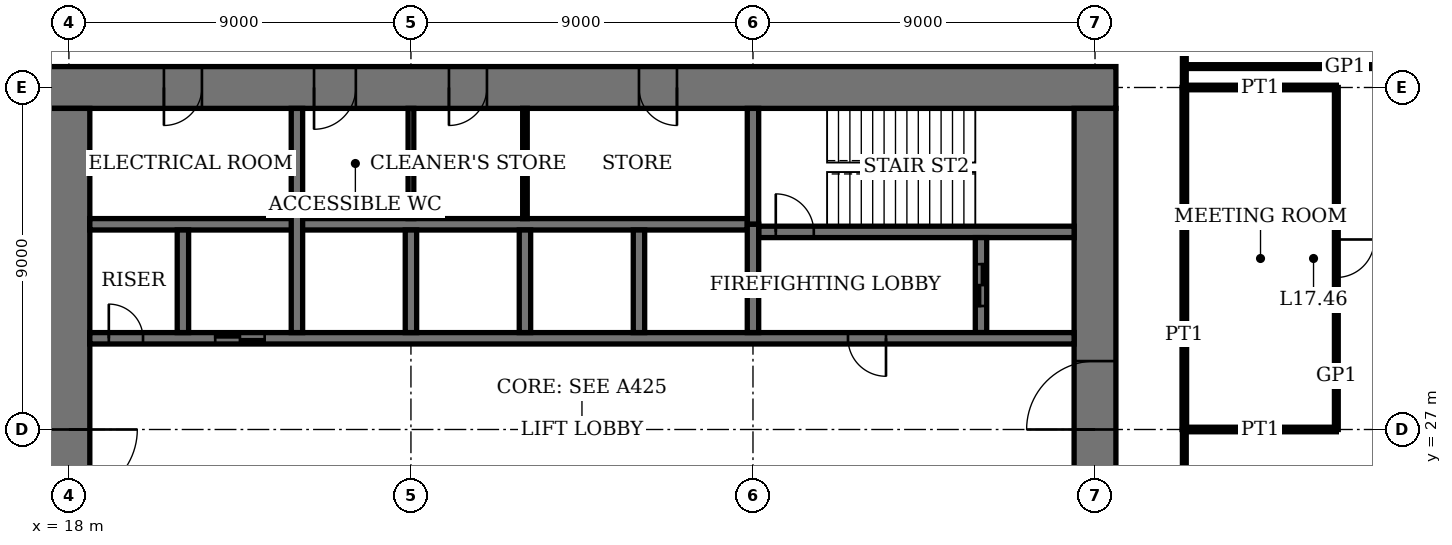
"""IFC4 building model, lengths in metres.
Left out: names, types, materials, properties, quantities, classifications, styles, units other than length and angle.
Written with IfcOpenShell. Run it as: python <this file> out.ifc"""

import sys

from ifc_helpers import new_model, si_unit, direction, frame, frame_2d, origin, place, context, subcontext, project, spatial, rectangle, extrude, element, fill, save


model = new_model("IFC4")
c1 = context("Model", 3, precision=1e-05, world=origin(), true_north=direction((0.0, 1.0)))
c2 = subcontext(c1, "Body", "Model", "MODEL_VIEW")
j1 = project(units=[si_unit("LENGTHUNIT", "METRE"), si_unit("PLANEANGLEUNIT", "RADIAN")], contexts=[c1])
p1 = place(None, origin())
s1 = spatial("IfcSite", under=j1, at=p1, CompositionType="ELEMENT")
p2 = place(p1, origin())
s2 = spatial("IfcBuilding", under=s1, at=p2, CompositionType="ELEMENT")
p3 = place(p2, frame((0.0, 0.0, 71.8)))
s3 = spatial("IfcBuildingStorey", under=s2, at=p3, CompositionType="ELEMENT", Elevation=71.8)
p4 = place(p3, frame((45.55, 36.0, 0.0), z_axis=(0.0, 0.0, 1.0), x_axis=(-1.0, 0.0, 0.0)))
e1 = element("IfcWall", 1, at=p4, inside=s3, PredefinedType="SHEAR", context=c2, shape_type="SweptSolid", body=[
    extrude(rectangle(XDim=28.1, YDim=1.1, at=frame_2d((14.05, 0.0))), origin(), (0.0, 0.0, 1.0), 4.0),
])
p5 = place(p4, frame((11.55, 0.0, 0.0)))
e2 = element("IfcOpeningElement", 2, at=p5, cuts=e1, PredefinedType="OPENING", context=c2, shape_type="SweptSolid", body=[
    extrude(rectangle(XDim=1.0, YDim=2.4, at=frame_2d((0.5, 1.2))), frame((0.0, 0.56, 0.0), z_axis=(0.0, -1.0, 0.0), x_axis=(1.0, 0.0, 0.0)), (0.0, 0.0, 1.0), 1.12),
])
p6 = place(p4, frame((16.55, 0.0, 0.0)))
e3 = element("IfcOpeningElement", 3, at=p6, cuts=e1, PredefinedType="OPENING", context=c2, shape_type="SweptSolid", body=[
    extrude(rectangle(XDim=1.0, YDim=2.4, at=frame_2d((0.5, 1.2))), frame((0.0, 0.56, 0.0), z_axis=(0.0, -1.0, 0.0), x_axis=(1.0, 0.0, 0.0)), (0.0, 0.0, 1.0), 1.12),
])
p7 = place(p4, frame((20.0, 0.0, 0.0)))
e4 = element("IfcOpeningElement", 4, at=p7, cuts=e1, PredefinedType="OPENING", context=c2, shape_type="SweptSolid", body=[
    extrude(rectangle(XDim=1.1, YDim=2.4, at=frame_2d((0.55, 1.2))), frame((0.0, 0.56, 0.0), z_axis=(0.0, -1.0, 0.0), x_axis=(1.0, 0.0, 0.0)), (0.0, 0.0, 1.0), 1.12),
])
p8 = place(p4, frame((24.05, 0.0, 0.0)))
e5 = element("IfcOpeningElement", 5, at=p8, cuts=e1, PredefinedType="OPENING", context=c2, shape_type="SweptSolid", body=[
    extrude(rectangle(XDim=1.0, YDim=2.4, at=frame_2d((0.5, 1.2))), frame((0.0, 0.56, 0.0), z_axis=(0.0, -1.0, 0.0), x_axis=(1.0, 0.0, 0.0)), (0.0, 0.0, 1.0), 1.12),
])
p9 = place(p3, frame((18.0, 35.45, 0.0), z_axis=(0.0, 0.0, 1.0), x_axis=(0.0, -1.0, 0.0)))
e6 = element("IfcWall", 6, at=p9, inside=s3, PredefinedType="SHEAR", context=c2, shape_type="SweptSolid", body=[
    extrude(rectangle(XDim=16.9, YDim=1.1, at=frame_2d((8.45, 0.0))), origin(), (0.0, 0.0, 1.0), 4.0),
])
p10 = place(p9, frame((8.45, 0.0, 0.0)))
e7 = element("IfcOpeningElement", 7, at=p10, cuts=e6, PredefinedType="OPENING", context=c2, shape_type="SweptSolid", body=[
    extrude(rectangle(XDim=1.8, YDim=2.4, at=frame_2d((0.9, 1.2))), frame((0.0, 0.56, 0.0), z_axis=(0.0, -1.0, 0.0), x_axis=(1.0, 0.0, 0.0)), (0.0, 0.0, 1.0), 1.12),
])
p11 = place(p3, frame((45.0, 18.55, 0.0), z_axis=(0.0, 0.0, 1.0), x_axis=(0.0, 1.0, 0.0)))
e8 = element("IfcWall", 8, at=p11, inside=s3, PredefinedType="SHEAR", context=c2, shape_type="SweptSolid", body=[
    extrude(rectangle(XDim=16.9, YDim=1.1, at=frame_2d((8.45, 0.0))), origin(), (0.0, 0.0, 1.0), 4.0),
])
p12 = place(p11, frame((8.45, 0.0, 0.0)))
e9 = element("IfcOpeningElement", 9, at=p12, cuts=e8, PredefinedType="OPENING", context=c2, shape_type="SweptSolid", body=[
    extrude(rectangle(XDim=1.8, YDim=2.4, at=frame_2d((0.9, 1.2))), frame((0.0, 0.56, 0.0), z_axis=(0.0, -1.0, 0.0), x_axis=(1.0, 0.0, 0.0)), (0.0, 0.0, 1.0), 1.12),
])
p13 = place(p3, frame((36.15, 32.2, 0.0), z_axis=(0.0, 0.0, 1.0), x_axis=(1.0, 0.0, 0.0)))
e10 = element("IfcWall", 10, at=p13, inside=s3, PredefinedType="SHEAR", context=c2, shape_type="SweptSolid", body=[
    extrude(rectangle(XDim=8.3, YDim=0.3, at=frame_2d((4.15, 0.0))), origin(), (0.0, 0.0, 1.0), 4.0),
])
p14 = place(p13, frame((0.45, 0.0, 0.0)))
e11 = element("IfcOpeningElement", 11, at=p14, cuts=e10, PredefinedType="OPENING", context=c2, shape_type="SweptSolid", body=[
    extrude(rectangle(XDim=1.0, YDim=2.4, at=frame_2d((0.5, 1.2))), frame((0.0, 0.16, 0.0), z_axis=(0.0, -1.0, 0.0), x_axis=(1.0, 0.0, 0.0)), (0.0, 0.0, 1.0), 0.32),
])
p15 = place(p3, frame((36.0, 32.4, 0.0), z_axis=(0.0, 0.0, 1.0), x_axis=(0.0, 1.0, 0.0)))
e12 = element("IfcWall", 12, at=p15, inside=s3, PredefinedType="SHEAR", context=c2, shape_type="SweptSolid", body=[
    extrude(rectangle(XDim=3.05, YDim=0.3, at=frame_2d((1.525, 0.0))), origin(), (0.0, 0.0, 1.0), 4.0),
])
p16 = place(p3, frame((42.0, 29.55, 0.0), z_axis=(0.0, 0.0, 1.0), x_axis=(0.0, 1.0, 0.0)))
e13 = element("IfcWall", 13, at=p16, inside=s3, PredefinedType="SHEAR", context=c2, shape_type="SweptSolid", body=[
    extrude(rectangle(XDim=2.5, YDim=0.3, at=frame_2d((1.25, 0.0))), origin(), (0.0, 0.0, 1.0), 4.0),
])
p17 = place(p16, frame((0.7, 0.0, 0.0)))
e14 = element("IfcOpeningElement", 14, at=p17, cuts=e13, PredefinedType="OPENING", context=c2, shape_type="SweptSolid", body=[
    extrude(rectangle(XDim=1.1, YDim=2.4, at=frame_2d((0.55, 1.2))), frame((0.0, 0.16, 0.0), z_axis=(0.0, -1.0, 0.0), x_axis=(1.0, 0.0, 0.0)), (0.0, 0.0, 1.0), 0.32),
])
p18 = place(p3, frame((18.55, 29.4, 0.0), z_axis=(0.0, 0.0, 1.0), x_axis=(1.0, 0.0, 0.0)))
e15 = element("IfcWall", 15, at=p18, inside=s3, PredefinedType="SHEAR", context=c2, shape_type="SweptSolid", body=[
    extrude(rectangle(XDim=25.9, YDim=0.3, at=frame_2d((12.95, 0.0))), origin(), (0.0, 0.0, 1.0), 4.0),
])
p19 = place(p18, frame((19.95, 0.0, 0.0)))
e16 = element("IfcOpeningElement", 16, at=p19, cuts=e15, PredefinedType="OPENING", context=c2, shape_type="SweptSolid", body=[
    extrude(rectangle(XDim=1.0, YDim=2.4, at=frame_2d((0.5, 1.2))), frame((0.0, 0.16, 0.0), z_axis=(0.0, -1.0, 0.0), x_axis=(1.0, 0.0, 0.0)), (0.0, 0.0, 1.0), 0.32),
])
p20 = place(p18, frame((0.5, 0.0, 0.0)))
e17 = element("IfcOpeningElement", 17, at=p20, cuts=e15, PredefinedType="OPENING", context=c2, shape_type="SweptSolid", body=[
    extrude(rectangle(XDim=0.9, YDim=2.1, at=frame_2d((0.45, 1.05))), frame((0.0, 0.16, 0.0), z_axis=(0.0, -1.0, 0.0), x_axis=(1.0, 0.0, 0.0)), (0.0, 0.0, 1.0), 0.32),
])
p21 = place(p18, frame((3.3, 0.0, 0.0)))
e18 = element("IfcOpeningElement", 18, at=p21, cuts=e15, PredefinedType="OPENING", context=c2, shape_type="SweptSolid", body=[
    extrude(rectangle(XDim=1.3, YDim=2.4, at=frame_2d((0.65, 1.2))), frame((0.0, 0.16, 0.0), z_axis=(0.0, -1.0, 0.0), x_axis=(1.0, 0.0, 0.0)), (0.0, 0.0, 1.0), 0.32),
])
p22 = place(p3, frame((18.55, 32.4, 0.0), z_axis=(0.0, 0.0, 1.0), x_axis=(1.0, 0.0, 0.0)))
e19 = element("IfcWall", 19, at=p22, inside=s3, PredefinedType="SHEAR", context=c2, shape_type="SweptSolid", body=[
    extrude(rectangle(XDim=17.3, YDim=0.3, at=frame_2d((8.65, 0.0))), origin(), (0.0, 0.0, 1.0), 4.0),
])
for number, where, z_axis, x_axis in (
    (20, (33.0, 29.55, 0.0), (0.0, 0.0, 1.0), (0.0, 1.0, 0.0)),
    (21, (30.0, 29.55, 0.0), (0.0, 0.0, 1.0), (0.0, 1.0, 0.0)),
    (22, (27.0, 29.55, 0.0), (0.0, 0.0, 1.0), (0.0, 1.0, 0.0)),
):
    element("IfcWall", number, at=place(p3, frame(where, z_axis=z_axis, x_axis=x_axis)), inside=s3, PredefinedType="SHEAR", context=c2, shape_type="SweptSolid", body=[
        extrude(rectangle(XDim=2.7, YDim=0.3, at=frame_2d((1.35, 0.0))), origin(), (0.0, 0.0, 1.0), 4.0),
    ])
p23 = place(p3, frame((24.0, 29.55, 0.0), z_axis=(0.0, 0.0, 1.0), x_axis=(0.0, 1.0, 0.0)))
e23 = element("IfcWall", 23, at=p23, inside=s3, PredefinedType="SHEAR", context=c2, shape_type="SweptSolid", body=[
    extrude(rectangle(XDim=5.9, YDim=0.3, at=frame_2d((2.95, 0.0))), origin(), (0.0, 0.0, 1.0), 4.0),
])
p24 = place(p3, frame((21.0, 29.55, 0.0), z_axis=(0.0, 0.0, 1.0), x_axis=(0.0, 1.0, 0.0)))
e24 = element("IfcWall", 24, at=p24, inside=s3, PredefinedType="SHEAR", context=c2, shape_type="SweptSolid", body=[
    extrude(rectangle(XDim=2.7, YDim=0.3, at=frame_2d((1.35, 0.0))), origin(), (0.0, 0.0, 1.0), 4.0),
])
p25 = place(p3, frame((36.0, 29.55, 0.0), z_axis=(0.0, 0.0, 1.0), x_axis=(0.0, 1.0, 0.0)))
e25 = element("IfcWall", 25, at=p25, inside=s3, PredefinedType="SHEAR", context=c2, shape_type="SweptSolid", body=[
    extrude(rectangle(XDim=2.85, YDim=0.3, at=frame_2d((1.425, 0.0))), origin(), (0.0, 0.0, 1.0), 4.0),
])
for number, where, z_axis, x_axis in (
    (26, (47.35, 27.0, 0.0), (0.0, 0.0, 1.0), (1.0, 0.0, 0.0)),
    (27, (47.35, 36.0, 0.0), (0.0, 0.0, 1.0), (1.0, 0.0, 0.0)),
):
    element("IfcWall", number, at=place(p3, frame(where, z_axis=z_axis, x_axis=x_axis)), inside=s3, PredefinedType="PARTITIONING", context=c2, shape_type="SweptSolid", body=[
        extrude(rectangle(XDim=4.0, YDim=0.12, at=frame_2d((2.0, 0.0))), origin(), (0.0, 0.0, 1.0), 3.05),
    ])
p26 = place(p3, frame((47.35, 36.55, 0.0), z_axis=(0.0, 0.0, 1.0), x_axis=(1.0, 0.0, 0.0)))
e28 = element("IfcWall", 28, at=p26, inside=s3, PredefinedType="PARTITIONING", context=c2, shape_type="SweptSolid", body=[
    extrude(rectangle(XDim=5.575, YDim=0.1, at=frame_2d((2.788, 0.0))), origin(), (0.0, 0.0, 1.0), 3.05),
])
p27 = place(p3, frame((47.35, 27.0, 0.0), z_axis=(0.0, 0.0, 1.0), x_axis=(0.0, 1.0, 0.0)))
e29 = element("IfcWall", 29, at=p27, inside=s3, PredefinedType="PARTITIONING", context=c2, shape_type="SweptSolid", body=[
    extrude(rectangle(XDim=9.0, YDim=0.12, at=frame_2d((4.5, 0.0))), origin(), (0.0, 0.0, 1.0), 3.75),
])
p28 = place(p3, frame((47.35, 15.65, 0.0), z_axis=(0.0, 0.0, 1.0), x_axis=(0.0, 1.0, 0.0)))
e30 = element("IfcWall", 30, at=p28, inside=s3, PredefinedType="PARTITIONING", context=c2, shape_type="SweptSolid", body=[
    extrude(rectangle(XDim=11.35, YDim=0.1, at=frame_2d((5.675, 0.0))), origin(), (0.0, 0.0, 1.0), 3.75),
])
p29 = place(p28, frame((5.175, 0.0, 0.0)))
e31 = element("IfcOpeningElement", 31, at=p29, cuts=e30, PredefinedType="OPENING", context=c2, shape_type="SweptSolid", body=[
    extrude(rectangle(XDim=1.0, YDim=2.4, at=frame_2d((0.5, 1.2))), frame((0.0, 0.06, 0.0), z_axis=(0.0, -1.0, 0.0), x_axis=(1.0, 0.0, 0.0)), (0.0, 0.0, 1.0), 0.12),
])
p30 = place(p3, frame((47.35, 36.0, 0.0), z_axis=(0.0, 0.0, 1.0), x_axis=(0.0, 1.0, 0.0)))
e32 = element("IfcWall", 32, at=p30, inside=s3, PredefinedType="PARTITIONING", context=c2, shape_type="SweptSolid", body=[
    extrude(rectangle(XDim=2.35, YDim=0.1, at=frame_2d((1.175, 0.0))), origin(), (0.0, 0.0, 1.0), 3.75),
])
p31 = place(p3, frame((51.35, 27.0, 0.0), z_axis=(0.0, 0.0, 1.0), x_axis=(0.0, 1.0, 0.0)))
e33 = element("IfcWall", 33, at=p31, inside=s3, PredefinedType="PARTITIONING", context=c2, shape_type="SweptSolid", body=[
    extrude(rectangle(XDim=9.0, YDim=0.1, at=frame_2d((4.5, 0.0))), origin(), (0.0, 0.0, 1.0), 3.75),
])
p32 = place(p31, frame((4.0, 0.0, 0.0)))
e34 = element("IfcOpeningElement", 34, at=p32, cuts=e33, PredefinedType="OPENING", context=c2, shape_type="SweptSolid", body=[
    extrude(rectangle(XDim=1.0, YDim=2.4, at=frame_2d((0.5, 1.2))), frame((0.0, 0.06, 0.0), z_axis=(0.0, -1.0, 0.0), x_axis=(1.0, 0.0, 0.0)), (0.0, 0.0, 1.0), 0.12),
])
p33 = place(p3, frame((30.0, 32.55, 0.0), z_axis=(0.0, 0.0, 1.0), x_axis=(0.0, 1.0, 0.0)))
e35 = element("IfcWall", 35, at=p33, inside=s3, PredefinedType="PARTITIONING", context=c2, shape_type="SweptSolid", body=[
    extrude(rectangle(XDim=2.9, YDim=0.12, at=frame_2d((1.45, 0.0))), origin(), (0.0, 0.0, 1.0), 3.75),
])
p34 = place(p3, frame((27.0, 32.55, 0.0), z_axis=(0.0, 0.0, 1.0), x_axis=(0.0, 1.0, 0.0)))
e36 = element("IfcWall", 36, at=p34, inside=s3, PredefinedType="PARTITIONING", context=c2, shape_type="SweptSolid", body=[
    extrude(rectangle(XDim=2.9, YDim=0.15, at=frame_2d((1.45, 0.0))), origin(), (0.0, 0.0, 1.0), 3.75),
])
p35 = place(p10, origin())
e37 = element("IfcDoor", 37, at=p35, inside=s3, OperationType="DOUBLE_DOOR_DOUBLE_SWING", PredefinedType="DOOR", context=c2, shape_type="SweptSolid", body=[
    extrude(rectangle(XDim=1.8, YDim=2.4, at=frame_2d((0.9, 1.2))), frame((0.0, 0.03, 0.0), z_axis=(0.0, -1.0, 0.0), x_axis=(1.0, 0.0, 0.0)), (0.0, 0.0, 1.0), 0.06),
    extrude(rectangle(XDim=0.04, YDim=2.4, at=frame_2d((0.02, 1.2))), frame((0.0, 0.55, 0.0), z_axis=(0.0, -1.0, 0.0), x_axis=(1.0, 0.0, 0.0)), (0.0, 0.0, 1.0), 1.1),
    extrude(rectangle(XDim=0.04, YDim=2.4, at=frame_2d((1.78, 1.2))), frame((0.0, 0.55, 0.0), z_axis=(0.0, -1.0, 0.0), x_axis=(1.0, 0.0, 0.0)), (0.0, 0.0, 1.0), 1.1),
    extrude(rectangle(XDim=1.8, YDim=0.04, at=frame_2d((0.9, 2.38))), frame((0.0, 0.55, 0.0), z_axis=(0.0, -1.0, 0.0), x_axis=(1.0, 0.0, 0.0)), (0.0, 0.0, 1.0), 1.1),
])
fill(e7, e37)
p36 = place(p12, origin())
e38 = element("IfcDoor", 38, at=p36, inside=s3, OperationType="DOUBLE_DOOR_DOUBLE_SWING", PredefinedType="DOOR", context=c2, shape_type="SweptSolid", body=[
    extrude(rectangle(XDim=1.8, YDim=2.4, at=frame_2d((0.9, 1.2))), frame((0.0, 0.03, 0.0), z_axis=(0.0, -1.0, 0.0), x_axis=(1.0, 0.0, 0.0)), (0.0, 0.0, 1.0), 0.06),
    extrude(rectangle(XDim=0.04, YDim=2.4, at=frame_2d((0.02, 1.2))), frame((0.0, 0.55, 0.0), z_axis=(0.0, -1.0, 0.0), x_axis=(1.0, 0.0, 0.0)), (0.0, 0.0, 1.0), 1.1),
    extrude(rectangle(XDim=0.04, YDim=2.4, at=frame_2d((1.78, 1.2))), frame((0.0, 0.55, 0.0), z_axis=(0.0, -1.0, 0.0), x_axis=(1.0, 0.0, 0.0)), (0.0, 0.0, 1.0), 1.1),
    extrude(rectangle(XDim=1.8, YDim=0.04, at=frame_2d((0.9, 2.38))), frame((0.0, 0.55, 0.0), z_axis=(0.0, -1.0, 0.0), x_axis=(1.0, 0.0, 0.0)), (0.0, 0.0, 1.0), 1.1),
])
fill(e9, e38)
p37 = place(p5, origin())
e39 = element("IfcDoor", 39, at=p37, inside=s3, OperationType="SINGLE_SWING_RIGHT", PredefinedType="DOOR", context=c2, shape_type="SweptSolid", body=[
    extrude(rectangle(XDim=1.0, YDim=2.4, at=frame_2d((0.5, 1.2))), frame((0.0, 0.025, 0.0), z_axis=(0.0, -1.0, 0.0), x_axis=(1.0, 0.0, 0.0)), (0.0, 0.0, 1.0), 0.05),
    extrude(rectangle(XDim=0.04, YDim=2.4, at=frame_2d((0.02, 1.2))), frame((0.0, 0.4, 0.0), z_axis=(0.0, -1.0, 0.0), x_axis=(1.0, 0.0, 0.0)), (0.0, 0.0, 1.0), 0.8),
    extrude(rectangle(XDim=0.04, YDim=2.4, at=frame_2d((0.98, 1.2))), frame((0.0, 0.4, 0.0), z_axis=(0.0, -1.0, 0.0), x_axis=(1.0, 0.0, 0.0)), (0.0, 0.0, 1.0), 0.8),
    extrude(rectangle(XDim=1.0, YDim=0.04, at=frame_2d((0.5, 2.38))), frame((0.0, 0.4, 0.0), z_axis=(0.0, -1.0, 0.0), x_axis=(1.0, 0.0, 0.0)), (0.0, 0.0, 1.0), 0.8),
])
fill(e2, e39)
p38 = place(p6, origin())
e40 = element("IfcDoor", 40, at=p38, inside=s3, OperationType="SINGLE_SWING_LEFT", PredefinedType="DOOR", context=c2, shape_type="SweptSolid", body=[
    extrude(rectangle(XDim=1.0, YDim=2.4, at=frame_2d((0.5, 1.2))), frame((0.0, 0.025, 0.0), z_axis=(0.0, -1.0, 0.0), x_axis=(1.0, 0.0, 0.0)), (0.0, 0.0, 1.0), 0.05),
    extrude(rectangle(XDim=0.04, YDim=2.4, at=frame_2d((0.02, 1.2))), frame((0.0, 0.4, 0.0), z_axis=(0.0, -1.0, 0.0), x_axis=(1.0, 0.0, 0.0)), (0.0, 0.0, 1.0), 0.8),
    extrude(rectangle(XDim=0.04, YDim=2.4, at=frame_2d((0.98, 1.2))), frame((0.0, 0.4, 0.0), z_axis=(0.0, -1.0, 0.0), x_axis=(1.0, 0.0, 0.0)), (0.0, 0.0, 1.0), 0.8),
    extrude(rectangle(XDim=1.0, YDim=0.04, at=frame_2d((0.5, 2.38))), frame((0.0, 0.4, 0.0), z_axis=(0.0, -1.0, 0.0), x_axis=(1.0, 0.0, 0.0)), (0.0, 0.0, 1.0), 0.8),
])
fill(e3, e40)
p39 = place(p7, origin())
e41 = element("IfcDoor", 41, at=p39, inside=s3, OperationType="SINGLE_SWING_LEFT", PredefinedType="DOOR", context=c2, shape_type="SweptSolid", body=[
    extrude(rectangle(XDim=1.1, YDim=2.4, at=frame_2d((0.55, 1.2))), frame((0.0, 0.025, 0.0), z_axis=(0.0, -1.0, 0.0), x_axis=(1.0, 0.0, 0.0)), (0.0, 0.0, 1.0), 0.05),
    extrude(rectangle(XDim=0.04, YDim=2.4, at=frame_2d((0.02, 1.2))), frame((0.0, 0.44, 0.0), z_axis=(0.0, -1.0, 0.0), x_axis=(1.0, 0.0, 0.0)), (0.0, 0.0, 1.0), 0.88),
    extrude(rectangle(XDim=0.04, YDim=2.4, at=frame_2d((1.08, 1.2))), frame((0.0, 0.44, 0.0), z_axis=(0.0, -1.0, 0.0), x_axis=(1.0, 0.0, 0.0)), (0.0, 0.0, 1.0), 0.88),
    extrude(rectangle(XDim=1.1, YDim=0.04, at=frame_2d((0.55, 2.38))), frame((0.0, 0.44, 0.0), z_axis=(0.0, -1.0, 0.0), x_axis=(1.0, 0.0, 0.0)), (0.0, 0.0, 1.0), 0.88),
])
fill(e4, e41)
p40 = place(p8, origin())
e42 = element("IfcDoor", 42, at=p40, inside=s3, OperationType="SINGLE_SWING_LEFT", PredefinedType="DOOR", context=c2, shape_type="SweptSolid", body=[
    extrude(rectangle(XDim=1.0, YDim=2.4, at=frame_2d((0.5, 1.2))), frame((0.0, 0.025, 0.0), z_axis=(0.0, -1.0, 0.0), x_axis=(1.0, 0.0, 0.0)), (0.0, 0.0, 1.0), 0.05),
    extrude(rectangle(XDim=0.04, YDim=2.4, at=frame_2d((0.02, 1.2))), frame((0.0, 0.4, 0.0), z_axis=(0.0, -1.0, 0.0), x_axis=(1.0, 0.0, 0.0)), (0.0, 0.0, 1.0), 0.8),
    extrude(rectangle(XDim=0.04, YDim=2.4, at=frame_2d((0.98, 1.2))), frame((0.0, 0.4, 0.0), z_axis=(0.0, -1.0, 0.0), x_axis=(1.0, 0.0, 0.0)), (0.0, 0.0, 1.0), 0.8),
    extrude(rectangle(XDim=1.0, YDim=0.04, at=frame_2d((0.5, 2.38))), frame((0.0, 0.4, 0.0), z_axis=(0.0, -1.0, 0.0), x_axis=(1.0, 0.0, 0.0)), (0.0, 0.0, 1.0), 0.8),
])
fill(e5, e42)
p41 = place(p14, origin())
e43 = element("IfcDoor", 43, at=p41, inside=s3, OperationType="SINGLE_SWING_RIGHT", PredefinedType="DOOR", context=c2, shape_type="SweptSolid", body=[
    extrude(rectangle(XDim=1.0, YDim=2.4, at=frame_2d((0.5, 1.2))), frame((0.0, 0.03, 0.0), z_axis=(0.0, -1.0, 0.0), x_axis=(1.0, 0.0, 0.0)), (0.0, 0.0, 1.0), 0.06),
])
fill(e11, e43)
p42 = place(p19, origin())
e44 = element("IfcDoor", 44, at=p42, inside=s3, OperationType="SINGLE_SWING_RIGHT", PredefinedType="DOOR", context=c2, shape_type="SweptSolid", body=[
    extrude(rectangle(XDim=1.0, YDim=2.4, at=frame_2d((0.5, 1.2))), frame((0.0, 0.03, 0.0), z_axis=(0.0, -1.0, 0.0), x_axis=(1.0, 0.0, 0.0)), (0.0, 0.0, 1.0), 0.06),
])
fill(e16, e44)
p43 = place(p20, origin())
e45 = element("IfcDoor", 45, at=p43, inside=s3, OperationType="SINGLE_SWING_RIGHT", PredefinedType="DOOR", context=c2, shape_type="SweptSolid", body=[
    extrude(rectangle(XDim=0.9, YDim=2.1, at=frame_2d((0.45, 1.05))), frame((0.0, 0.03, 0.0), z_axis=(0.0, -1.0, 0.0), x_axis=(1.0, 0.0, 0.0)), (0.0, 0.0, 1.0), 0.06),
])
fill(e17, e45)
p44 = place(p32, origin())
e46 = element("IfcDoor", 46, at=p44, inside=s3, OperationType="SINGLE_SWING_RIGHT", PredefinedType="DOOR", context=c2, shape_type="SweptSolid", body=[
    extrude(rectangle(XDim=1.0, YDim=2.4, at=frame_2d((0.5, 1.2))), frame((0.0, 0.02, 0.0), z_axis=(0.0, -1.0, 0.0), x_axis=(1.0, 0.0, 0.0)), (0.0, 0.0, 1.0), 0.04),
])
fill(e34, e46)
p45 = place(p21, origin())
e47 = element("IfcDoor", 47, at=p45, inside=s3, OperationType="DOUBLE_DOOR_SLIDING", PredefinedType="DOOR", context=c2, shape_type="SweptSolid", body=[
    extrude(rectangle(XDim=1.3, YDim=2.4, at=frame_2d((0.65, 1.2))), frame((0.0, 0.02, 0.0), z_axis=(0.0, -1.0, 0.0), x_axis=(1.0, 0.0, 0.0)), (0.0, 0.0, 1.0), 0.04),
])
fill(e18, e47)
p46 = place(p17, origin())
e48 = element("IfcDoor", 48, at=p46, inside=s3, OperationType="DOUBLE_DOOR_SLIDING", PredefinedType="DOOR", context=c2, shape_type="SweptSolid", body=[
    extrude(rectangle(XDim=1.1, YDim=2.4, at=frame_2d((0.55, 1.2))), frame((0.0, 0.03, 0.0), z_axis=(0.0, -1.0, 0.0), x_axis=(1.0, 0.0, 0.0)), (0.0, 0.0, 1.0), 0.06),
])
fill(e14, e48)
save(model, sys.argv[1])
